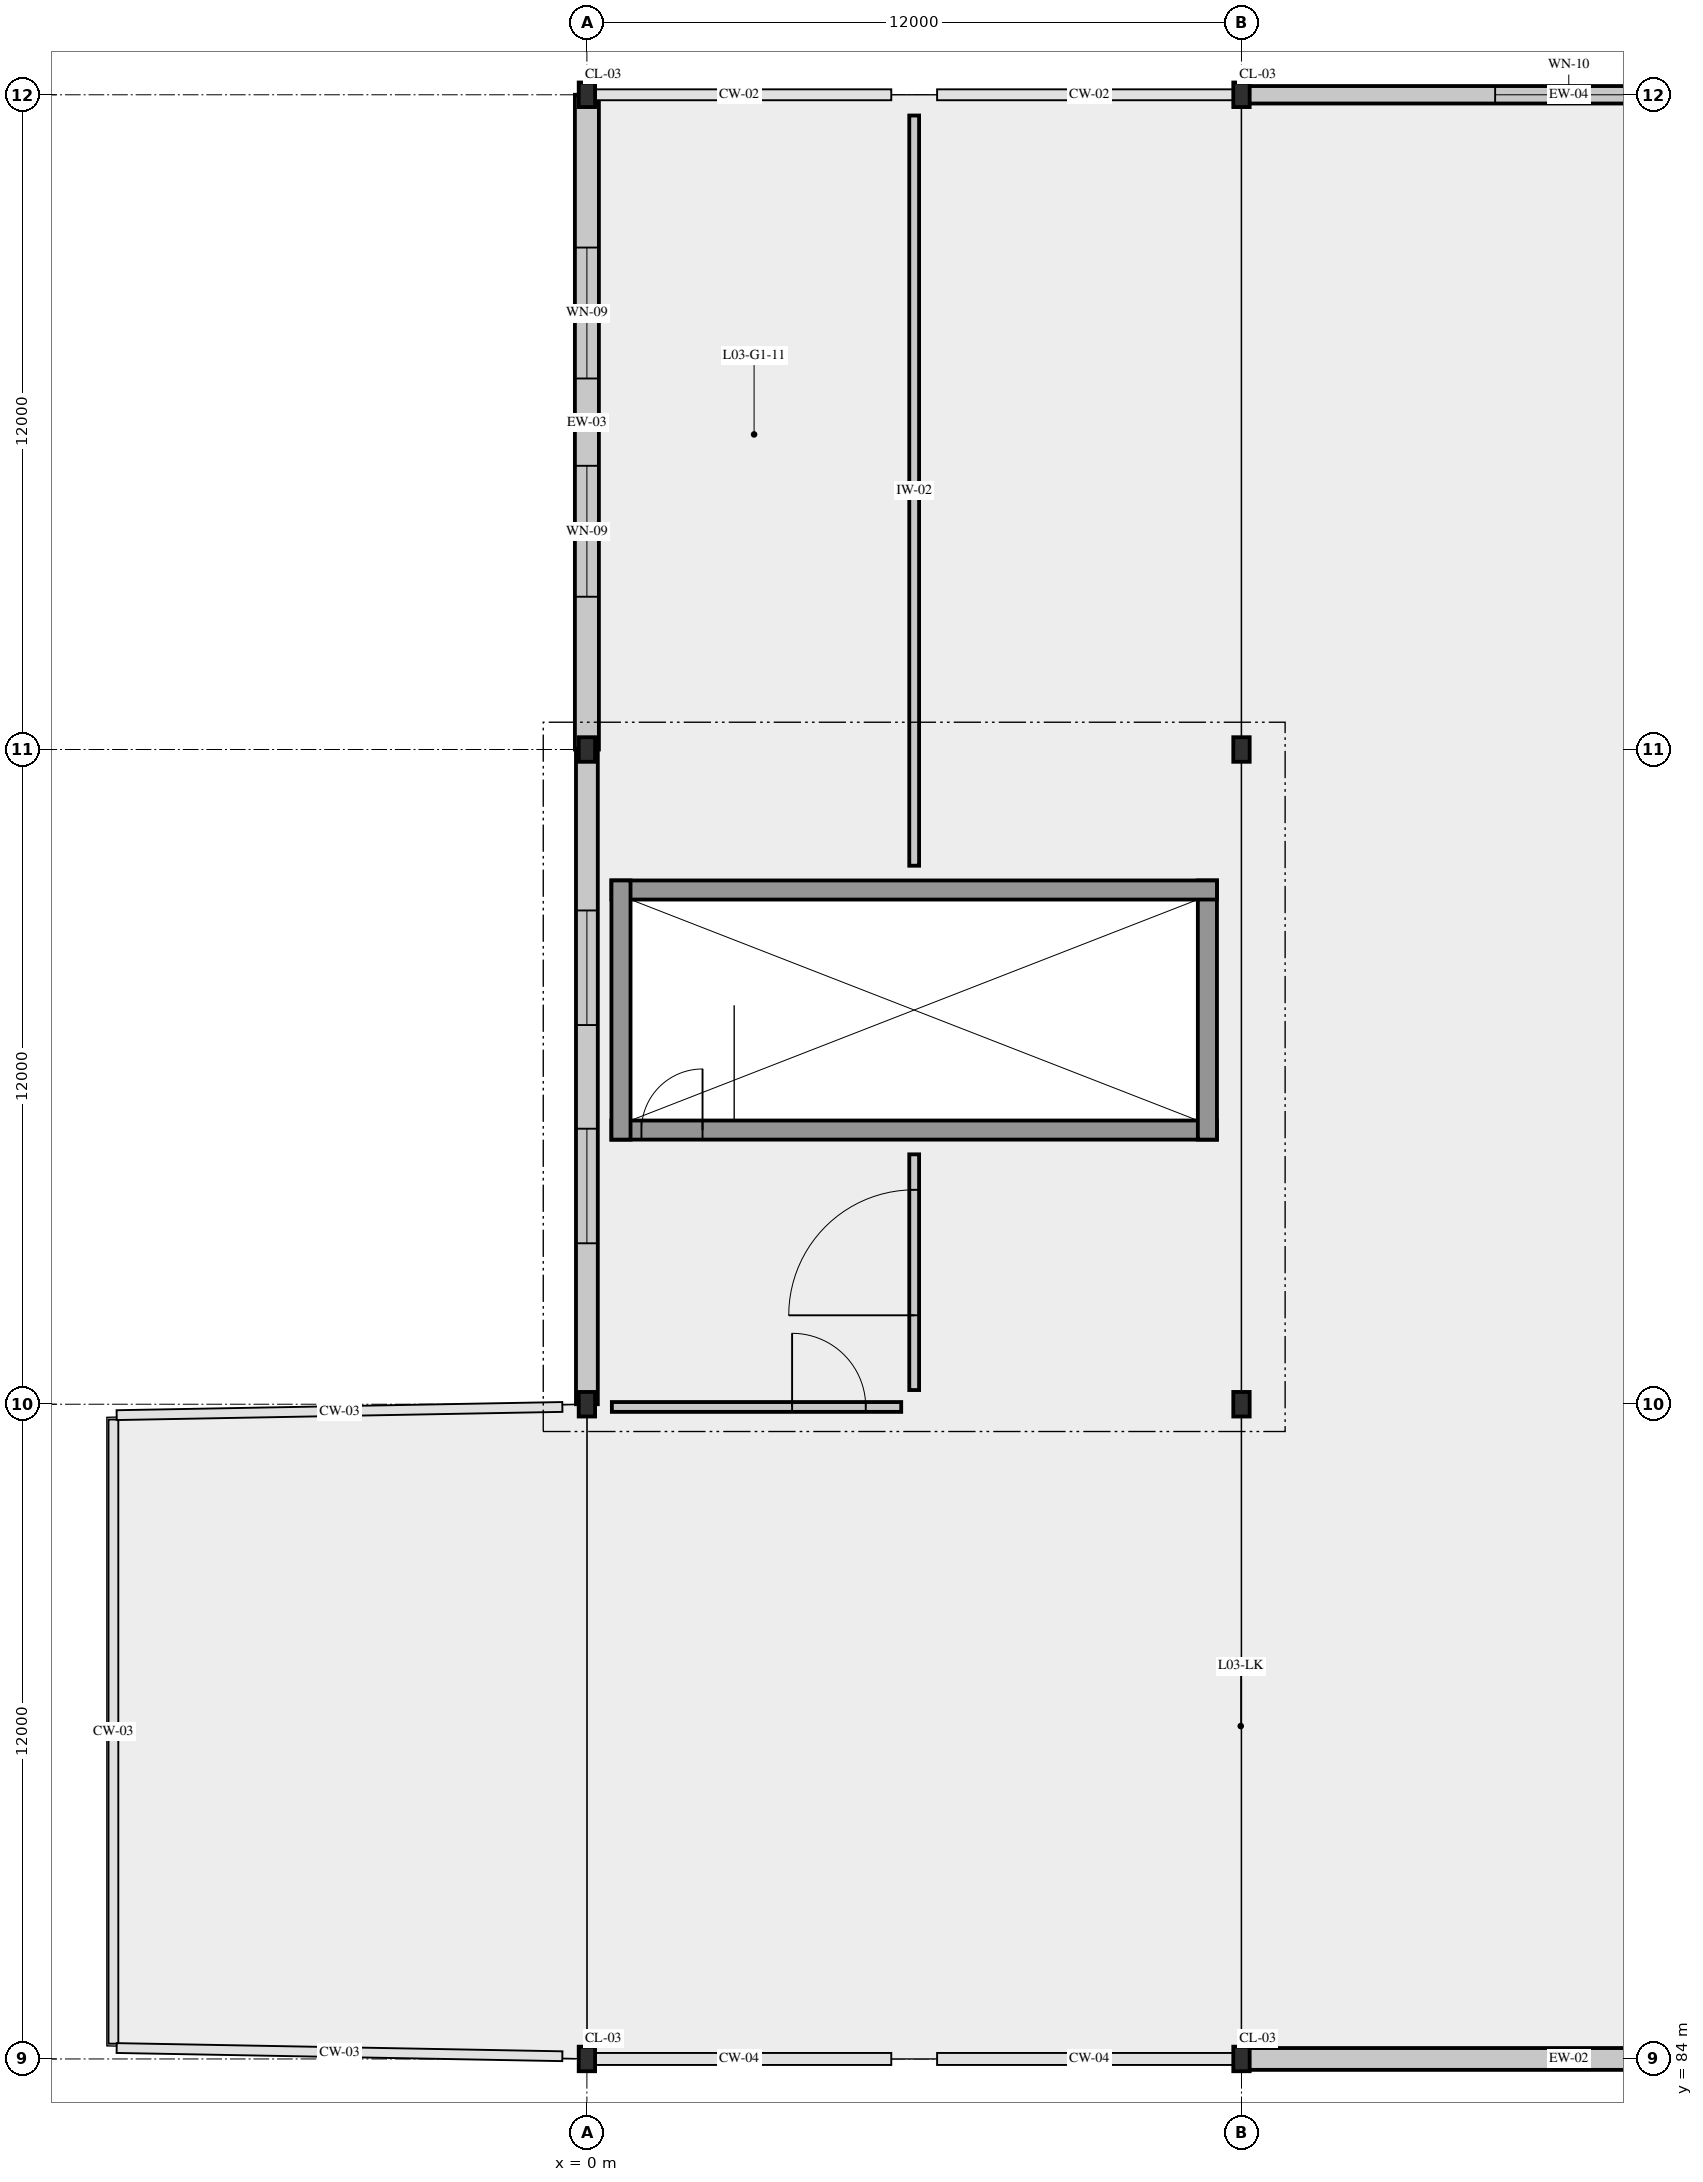
"""IFC4 building model, lengths in metres.
Left out: names, types, materials, properties, quantities, classifications, styles, units other than length and angle.
Written with IfcOpenShell. Run it as: python <this file> out.ifc"""

import sys

from ifc_helpers import new_model, si_unit, direction, frame, frame_2d, origin, origin_2d, place, context, subcontext, project, spatial, rectangle, i_section, extrude, element, fill, save


model = new_model("IFC4")
c1 = context("Model", 3, precision=1e-05, world=origin(), true_north=direction((0.0, 1.0)))
c2 = subcontext(c1, "Body", "Model", "MODEL_VIEW")
j1 = project(units=[si_unit("LENGTHUNIT", "METRE"), si_unit("PLANEANGLEUNIT", "RADIAN")], contexts=[c1])
p1 = place(None, origin())
s1 = spatial("IfcSite", under=j1, at=p1, CompositionType="ELEMENT")
p2 = place(p1, origin())
s2 = spatial("IfcBuilding", under=s1, at=p2, CompositionType="ELEMENT")
p3 = place(p2, frame((0.0, 0.0, 16.8)))
s3 = spatial("IfcBuildingStorey", under=s2, at=p3, CompositionType="ELEMENT", Elevation=16.8)
for number, where, z_axis, x_axis in (
    (1, (0.0, 84.0, 0.0), (0.0, 0.0, 1.0), (1.0, 0.0, 0.0)),
    (2, (0.0, 96.0, 0.0), (0.0, 0.0, 1.0), (1.0, 0.0, 0.0)),
    (3, (0.0, 108.0, 0.0), (0.0, 0.0, 1.0), (1.0, 0.0, 0.0)),
    (4, (0.0, 120.0, 0.0), (0.0, 0.0, 1.0), (1.0, 0.0, 0.0)),
    (5, (12.0, 84.0, 0.0), (0.0, 0.0, 1.0), (1.0, 0.0, 0.0)),
    (6, (12.0, 96.0, 0.0), (0.0, 0.0, 1.0), (1.0, 0.0, 0.0)),
    (7, (12.0, 108.0, 0.0), (0.0, 0.0, 1.0), (1.0, 0.0, 0.0)),
    (8, (12.0, 120.0, 0.0), (0.0, 0.0, 1.0), (1.0, 0.0, 0.0)),
):
    element("IfcColumn", number, at=place(p3, frame(where, z_axis=z_axis, x_axis=x_axis)), inside=s3, PredefinedType="COLUMN", context=c2, shape_type="SweptSolid", body=[
        extrude(i_section(OverallWidth=0.3, OverallDepth=0.45, WebThickness=0.014, FlangeThickness=0.026, FilletRadius=0.027, at=origin_2d()), origin(), (0.0, 0.0, 1.0), 6.6),
    ])
p4 = place(p3, frame((0.0, 108.0, 0.0), z_axis=(0.0, 0.0, 1.0), x_axis=(0.0, -1.0, 0.0)))
e9 = element("IfcWall", 9, at=p4, inside=s3, PredefinedType="SOLIDWALL", context=c2, shape_type="SweptSolid", body=[
    extrude(rectangle(XDim=12.0, YDim=0.4, at=frame_2d((6.0, 0.0))), origin(), (0.0, 0.0, 1.0), 5.75),
])
p5 = place(p4, frame((2.95, 0.0, 0.95)))
e10 = element("IfcOpeningElement", 10, at=p5, cuts=e9, PredefinedType="OPENING", context=c2, shape_type="SweptSolid", body=[
    extrude(rectangle(XDim=2.1, YDim=1.5, at=frame_2d((1.05, 0.75))), frame((0.0, 0.21, 0.0), z_axis=(0.0, -1.0, 0.0), x_axis=(1.0, 0.0, 0.0)), (0.0, 0.0, 1.0), 0.42),
])
p6 = place(p4, frame((6.95, 0.0, 0.95)))
e11 = element("IfcOpeningElement", 11, at=p6, cuts=e9, PredefinedType="OPENING", context=c2, shape_type="SweptSolid", body=[
    extrude(rectangle(XDim=2.1, YDim=1.5, at=frame_2d((1.05, 0.75))), frame((0.0, 0.21, 0.0), z_axis=(0.0, -1.0, 0.0), x_axis=(1.0, 0.0, 0.0)), (0.0, 0.0, 1.0), 0.42),
])
p7 = place(p3, frame((0.0, 120.0, 0.0), z_axis=(0.0, 0.0, 1.0), x_axis=(0.0, -1.0, 0.0)))
e12 = element("IfcWall", 12, at=p7, inside=s3, PredefinedType="SOLIDWALL", context=c2, shape_type="SweptSolid", body=[
    extrude(rectangle(XDim=12.0, YDim=0.44, at=frame_2d((6.0, 0.0))), origin(), (0.0, 0.0, 1.0), 5.75),
])
p8 = place(p7, frame((2.8, 0.0, 0.95)))
e13 = element("IfcOpeningElement", 13, at=p8, cuts=e12, PredefinedType="OPENING", context=c2, shape_type="SweptSolid", body=[
    extrude(rectangle(XDim=2.4, YDim=1.5, at=frame_2d((1.2, 0.75))), frame((0.0, 0.23, 0.0), z_axis=(0.0, -1.0, 0.0), x_axis=(1.0, 0.0, 0.0)), (0.0, 0.0, 1.0), 0.46),
])
p9 = place(p7, frame((6.8, 0.0, 0.95)))
e14 = element("IfcOpeningElement", 14, at=p9, cuts=e12, PredefinedType="OPENING", context=c2, shape_type="SweptSolid", body=[
    extrude(rectangle(XDim=2.4, YDim=1.5, at=frame_2d((1.2, 0.75))), frame((0.0, 0.23, 0.0), z_axis=(0.0, -1.0, 0.0), x_axis=(1.0, 0.0, 0.0)), (0.0, 0.0, 1.0), 0.46),
])
p10 = place(p3, frame((12.0, 84.0, 0.0), z_axis=(0.0, 0.0, 1.0), x_axis=(1.0, 0.0, 0.0)))
e15 = element("IfcWall", 15, at=p10, inside=s3, PredefinedType="SOLIDWALL", context=c2, shape_type="SweptSolid", body=[
    extrude(rectangle(XDim=12.0, YDim=0.4, at=frame_2d((6.0, 0.0))), origin(), (0.0, 0.0, 1.0), 5.6),
])
p11 = place(p3, frame((24.0, 120.0, 0.0), z_axis=(0.0, 0.0, 1.0), x_axis=(-1.0, 0.0, 0.0)))
e16 = element("IfcWall", 16, at=p11, inside=s3, PredefinedType="SOLIDWALL", context=c2, shape_type="SweptSolid", body=[
    extrude(rectangle(XDim=12.0, YDim=0.32, at=frame_2d((6.0, 0.0))), origin(), (0.0, 0.0, 1.0), 5.75),
])
p12 = place(p11, frame((4.65, 0.0, 0.95)))
e17 = element("IfcOpeningElement", 17, at=p12, cuts=e16, PredefinedType="OPENING", context=c2, shape_type="SweptSolid", body=[
    extrude(rectangle(XDim=2.7, YDim=1.5, at=frame_2d((1.35, 0.75))), frame((0.0, 0.17, 0.0), z_axis=(0.0, -1.0, 0.0), x_axis=(1.0, 0.0, 0.0)), (0.0, 0.0, 1.0), 0.34),
])
p13 = place(p3, frame((0.45, 101.025, 0.0), z_axis=(0.0, 0.0, 1.0), x_axis=(1.0, 0.0, 0.0)))
e18 = element("IfcWall", 18, at=p13, inside=s3, PredefinedType="SHEAR", context=c2, shape_type="SweptSolid", body=[
    extrude(rectangle(XDim=11.1, YDim=0.35, at=frame_2d((5.55, 0.0))), origin(), (0.0, 0.0, 1.0), 6.35),
])
p14 = place(p13, frame((0.55, 0.0, 0.0)))
e19 = element("IfcOpeningElement", 19, at=p14, cuts=e18, PredefinedType="OPENING", context=c2, shape_type="SweptSolid", body=[
    extrude(rectangle(XDim=1.12, YDim=2.2, at=frame_2d((0.56, 1.1))), frame((0.0, 0.185, 0.0), z_axis=(0.0, -1.0, 0.0), x_axis=(1.0, 0.0, 0.0)), (0.0, 0.0, 1.0), 0.37),
])
p15 = place(p3, frame((11.375, 100.85, 0.0), z_axis=(0.0, 0.0, 1.0), x_axis=(0.0, 1.0, 0.0)))
e20 = element("IfcWall", 20, at=p15, inside=s3, PredefinedType="SHEAR", context=c2, shape_type="SweptSolid", body=[
    extrude(rectangle(XDim=4.75, YDim=0.35, at=frame_2d((2.375, 0.0))), origin(), (0.0, 0.0, 1.0), 6.35),
])
p16 = place(p3, frame((11.55, 105.425, 0.0), z_axis=(0.0, 0.0, 1.0), x_axis=(-1.0, 0.0, 0.0)))
e21 = element("IfcWall", 21, at=p16, inside=s3, PredefinedType="SHEAR", context=c2, shape_type="SweptSolid", body=[
    extrude(rectangle(XDim=11.1, YDim=0.35, at=frame_2d((5.55, 0.0))), origin(), (0.0, 0.0, 1.0), 6.35),
])
p17 = place(p3, frame((0.625, 105.6, 0.0), z_axis=(0.0, 0.0, 1.0), x_axis=(0.0, -1.0, 0.0)))
e22 = element("IfcWall", 22, at=p17, inside=s3, PredefinedType="SHEAR", context=c2, shape_type="SweptSolid", body=[
    extrude(rectangle(XDim=4.75, YDim=0.35, at=frame_2d((2.375, 0.0))), origin(), (0.0, 0.0, 1.0), 6.35),
])
p18 = place(p3, frame((0.458, 95.95, 0.0), z_axis=(0.0, 0.0, 1.0), x_axis=(1.0, 0.0, 0.0)))
e23 = element("IfcWall", 23, at=p18, inside=s3, PredefinedType="PARTITIONING", context=c2, shape_type="SweptSolid", body=[
    extrude(rectangle(XDim=5.304, YDim=0.18, at=frame_2d((2.652, 0.0))), origin(), (0.0, 0.0, 1.0), 5.87),
])
p19 = place(p18, frame((3.304, 0.0, 0.0)))
e24 = element("IfcOpeningElement", 24, at=p19, cuts=e23, PredefinedType="OPENING", context=c2, shape_type="SweptSolid", body=[
    extrude(rectangle(XDim=1.35, YDim=2.3, at=frame_2d((0.675, 1.15))), frame((0.0, 0.1, 0.0), z_axis=(0.0, -1.0, 0.0), x_axis=(1.0, 0.0, 0.0)), (0.0, 0.0, 1.0), 0.2),
])
p20 = place(p3, frame((6.0, 96.26, 0.0), z_axis=(0.0, 0.0, 1.0), x_axis=(0.0, 1.0, 0.0)))
e25 = element("IfcWall", 25, at=p20, inside=s3, PredefinedType="PARTITIONING", context=c2, shape_type="SweptSolid", body=[
    extrude(rectangle(XDim=4.32, YDim=0.18, at=frame_2d((2.16, 0.0))), origin(), (0.0, 0.0, 1.0), 5.87),
])
p21 = place(p20, frame((1.37, 0.0, 0.0)))
e26 = element("IfcOpeningElement", 26, at=p21, cuts=e25, PredefinedType="OPENING", context=c2, shape_type="SweptSolid", body=[
    extrude(rectangle(XDim=2.3, YDim=2.6, at=frame_2d((1.15, 1.3))), frame((0.0, 0.1, 0.0), z_axis=(0.0, -1.0, 0.0), x_axis=(1.0, 0.0, 0.0)), (0.0, 0.0, 1.0), 0.2),
])
p22 = place(p3, frame((6.0, 105.87, 0.0), z_axis=(0.0, 0.0, 1.0), x_axis=(0.0, 1.0, 0.0)))
e27 = element("IfcWall", 27, at=p22, inside=s3, PredefinedType="PARTITIONING", context=c2, shape_type="SweptSolid", body=[
    extrude(rectangle(XDim=13.75, YDim=0.18, at=frame_2d((6.875, 0.0))), origin(), (0.0, 0.0, 1.0), 5.87),
])
p23 = place(p5, origin())
e28 = element("IfcWindow", 28, at=p23, inside=s3, PartitioningType="SINGLE_PANEL", PredefinedType="WINDOW", context=c2, shape_type="SweptSolid", body=[
    extrude(rectangle(XDim=2.1, YDim=1.5, at=frame_2d((1.05, 0.75))), frame((0.0, 0.03, 0.0), z_axis=(0.0, -1.0, 0.0), x_axis=(1.0, 0.0, 0.0)), (0.0, 0.0, 1.0), 0.06),
])
fill(e10, e28)
p24 = place(p6, origin())
e29 = element("IfcWindow", 29, at=p24, inside=s3, PartitioningType="SINGLE_PANEL", PredefinedType="WINDOW", context=c2, shape_type="SweptSolid", body=[
    extrude(rectangle(XDim=2.1, YDim=1.5, at=frame_2d((1.05, 0.75))), frame((0.0, 0.03, 0.0), z_axis=(0.0, -1.0, 0.0), x_axis=(1.0, 0.0, 0.0)), (0.0, 0.0, 1.0), 0.06),
])
fill(e11, e29)
p25 = place(p8, origin())
e30 = element("IfcWindow", 30, at=p25, inside=s3, PartitioningType="SINGLE_PANEL", PredefinedType="WINDOW", context=c2, shape_type="SweptSolid", body=[
    extrude(rectangle(XDim=2.4, YDim=1.5, at=frame_2d((1.2, 0.75))), frame((0.0, 0.03, 0.0), z_axis=(0.0, -1.0, 0.0), x_axis=(1.0, 0.0, 0.0)), (0.0, 0.0, 1.0), 0.06),
])
fill(e13, e30)
p26 = place(p9, origin())
e31 = element("IfcWindow", 31, at=p26, inside=s3, PartitioningType="SINGLE_PANEL", PredefinedType="WINDOW", context=c2, shape_type="SweptSolid", body=[
    extrude(rectangle(XDim=2.4, YDim=1.5, at=frame_2d((1.2, 0.75))), frame((0.0, 0.03, 0.0), z_axis=(0.0, -1.0, 0.0), x_axis=(1.0, 0.0, 0.0)), (0.0, 0.0, 1.0), 0.06),
])
fill(e14, e31)
p27 = place(p12, origin())
e32 = element("IfcWindow", 32, at=p27, inside=s3, PartitioningType="SINGLE_PANEL", PredefinedType="WINDOW", context=c2, shape_type="SweptSolid", body=[
    extrude(rectangle(XDim=2.7, YDim=1.5, at=frame_2d((1.35, 0.75))), frame((0.0, 0.03, 0.0), z_axis=(0.0, -1.0, 0.0), x_axis=(1.0, 0.0, 0.0)), (0.0, 0.0, 1.0), 0.06),
])
fill(e17, e32)
p28 = place(p14, origin())
e33 = element("IfcDoor", 33, at=p28, inside=s3, OperationType="SINGLE_SWING_RIGHT", PredefinedType="DOOR", context=c2, shape_type="SweptSolid", body=[
    extrude(rectangle(XDim=1.12, YDim=2.2, at=frame_2d((0.56, 1.1))), frame((0.0, 0.025, 0.0), z_axis=(0.0, -1.0, 0.0), x_axis=(1.0, 0.0, 0.0)), (0.0, 0.0, 1.0), 0.05),
])
fill(e19, e33)
p29 = place(p19, origin())
e34 = element("IfcDoor", 34, at=p29, inside=s3, OperationType="DOUBLE_SWING_LEFT", PredefinedType="DOOR", context=c2, shape_type="SweptSolid", body=[
    extrude(rectangle(XDim=1.35, YDim=2.3, at=frame_2d((0.675, 1.15))), frame((0.0, 0.025, 0.0), z_axis=(0.0, -1.0, 0.0), x_axis=(1.0, 0.0, 0.0)), (0.0, 0.0, 1.0), 0.05),
])
fill(e24, e34)
p30 = place(p21, origin())
e35 = element("IfcDoor", 35, at=p30, inside=s3, OperationType="DOUBLE_DOOR_SINGLE_SWING", PredefinedType="DOOR", context=c2, shape_type="SweptSolid", body=[
    extrude(rectangle(XDim=2.3, YDim=2.6, at=frame_2d((1.15, 1.3))), frame((0.0, 0.025, 0.0), z_axis=(0.0, -1.0, 0.0), x_axis=(1.0, 0.0, 0.0)), (0.0, 0.0, 1.0), 0.05),
])
fill(e26, e35)
save(model, sys.argv[1])
